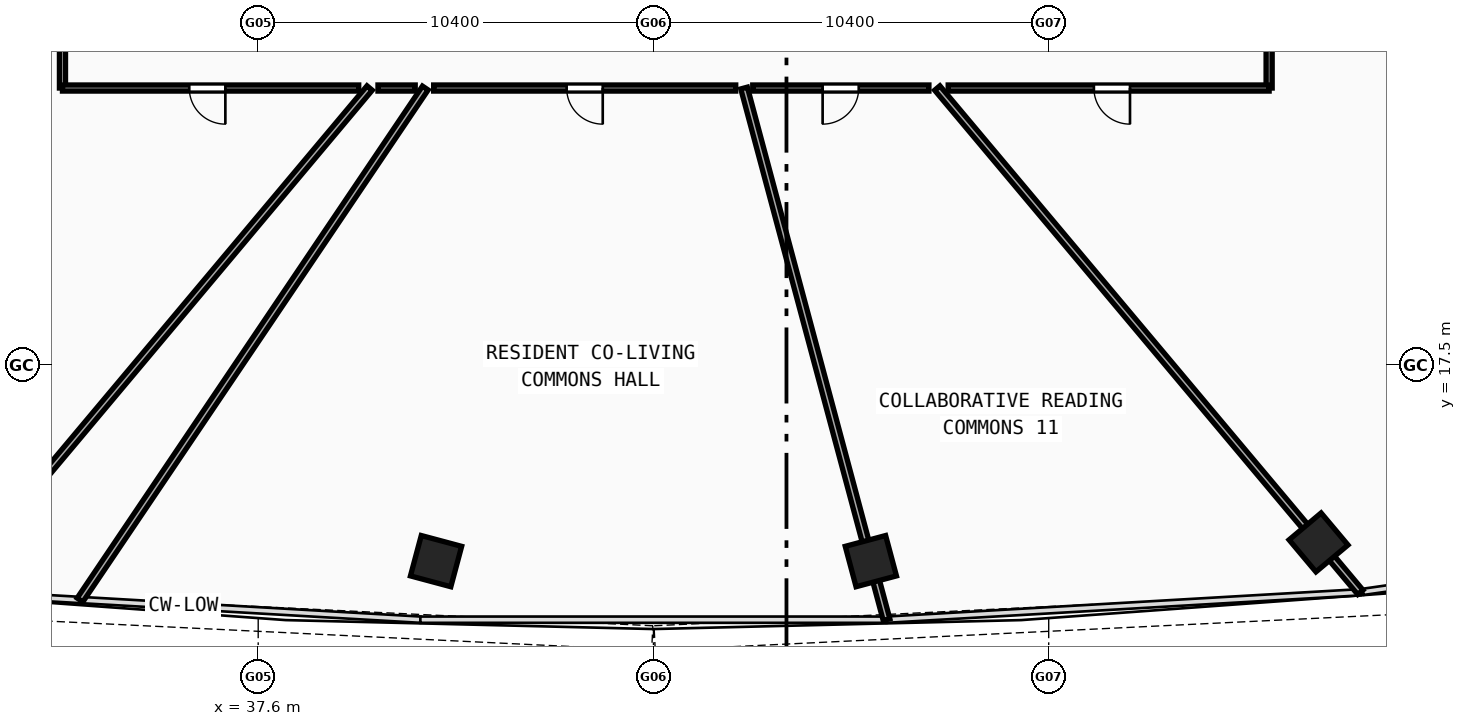
"""IFC4 building model, lengths in metres.
Left out: names, types, materials, properties, quantities, classifications, styles, units other than length and angle.
Written with IfcOpenShell. Run it as: python <this file> out.ifc"""

import sys

from ifc_helpers import new_model, si_unit, direction, frame, frame_2d, origin, origin_with_axes, origin_2d, place, context, subcontext, project, spatial, rectangle, hollow_rectangle, extrude, source, transform, mapped, element, fill, save


model = new_model("IFC4")
c1 = context("Model", 3, precision=1e-05, world=origin(), true_north=direction((0.0, 1.0)))
c2 = subcontext(c1, "Body", "Model", "MODEL_VIEW")
j1 = project(units=[si_unit("LENGTHUNIT", "METRE"), si_unit("PLANEANGLEUNIT", "RADIAN")], contexts=[c1])
p1 = place(None, origin())
s1 = spatial("IfcSite", under=j1, at=p1, CompositionType="ELEMENT")
p2 = place(p1, origin())
s2 = spatial("IfcBuilding", under=s1, at=p2, CompositionType="ELEMENT")
p3 = place(p2, frame((0.0, 0.0, 44.92)))
s3 = spatial("IfcBuildingStorey", under=s2, at=p3, CompositionType="ELEMENT", Elevation=44.92)
m1 = source(origin(), c2, "Body", "SweptSolid", [
    extrude(hollow_rectangle(XDim=1.1, YDim=1.1, WallThickness=0.045, at=origin_2d()), origin(), (0.0, 0.0, 1.0), 3.63),
])
for number, where, z_axis, x_axis in (
    (1, (42.28, 12.352, -0.26), (0.0, 0.0, 1.0), (0.966, -0.259, 0.0)),
    (2, (53.72, 12.352, -0.26), (0.0, 0.0, 1.0), (0.966, 0.259, 0.0)),
    (3, (65.5, 12.844, -0.26), (0.0, 0.0, 1.0), (0.766, 0.643, 0.0)),
):
    element("IfcColumn", number, at=place(p3, frame(where, z_axis=z_axis, x_axis=x_axis)), inside=s3, PredefinedType="COLUMN", context=c2, shape_type="MappedRepresentation", body=[
        mapped(m1, transform((0.0, 0.0, 0.0), scale=1.0)),
    ])
p4 = place(p3, frame((40.532, 24.8, 0.0), z_axis=(0.0, 0.0, 1.0), x_axis=(-0.642784696521, -0.766046887546, 0.0)))
e4 = element("IfcWall", 4, at=p4, inside=s3, PredefinedType="PARTITIONING", context=c2, shape_type="SweptSolid", body=[
    extrude(rectangle(XDim=17.319, YDim=0.18, at=frame_2d((8.659, 0.0))), origin(), (0.0, 0.0, 1.0), 2.67),
])
p5 = place(p3, frame((41.997, 24.8, 0.0), z_axis=(0.0, 0.0, 1.0), x_axis=(-0.559182499599, -0.82904458996, 0.0)))
e5 = element("IfcWall", 5, at=p5, inside=s3, PredefinedType="PARTITIONING", context=c2, shape_type="SweptSolid", body=[
    extrude(rectangle(XDim=16.248, YDim=0.18, at=frame_2d((8.124, 0.0))), origin(), (0.0, 0.0, 1.0), 2.67),
])
p6 = place(p3, frame((50.385, 24.8, 0.0), z_axis=(0.0, 0.0, 1.0), x_axis=(0.258819787056, -0.965925627483, 0.0)))
e6 = element("IfcWall", 6, at=p6, inside=s3, PredefinedType="PARTITIONING", context=c2, shape_type="SweptSolid", body=[
    extrude(rectangle(XDim=14.482, YDim=0.18, at=frame_2d((7.241, 0.0))), origin(), (0.0, 0.0, 1.0), 2.67),
])
p7 = place(p3, frame((55.468, 24.8, 0.0), z_axis=(0.0, 0.0, 1.0), x_axis=(0.642784696521, -0.766046887546, 0.0)))
e7 = element("IfcWall", 7, at=p7, inside=s3, PredefinedType="PARTITIONING", context=c2, shape_type="SweptSolid", body=[
    extrude(rectangle(XDim=17.319, YDim=0.18, at=frame_2d((8.659, 0.0))), origin(), (0.0, 0.0, 1.0), 2.67),
])
p8 = place(p3, frame((32.45, 24.8, 0.0), z_axis=(0.0, 0.0, 1.0), x_axis=(0.0, 1.0, 0.0)))
e8 = element("IfcWall", 8, at=p8, inside=s3, PredefinedType="PARTITIONING", context=c2, shape_type="SweptSolid", body=[
    extrude(rectangle(XDim=5.935, YDim=0.16, at=frame_2d((2.967, 0.0))), origin(), (0.0, 0.0, 1.0), 2.97),
])
p9 = place(p3, frame((64.2, 30.62, 0.0), z_axis=(0.0, 0.0, 1.0), x_axis=(0.0, -1.0, 0.0)))
e9 = element("IfcWall", 9, at=p9, inside=s3, PredefinedType="PARTITIONING", context=c2, shape_type="SweptSolid", body=[
    extrude(rectangle(XDim=5.82, YDim=0.16, at=frame_2d((2.91, 0.0))), origin(), (0.0, 0.0, 1.0), 2.97),
])
p10 = place(p3, frame((64.2, 24.8, 0.0), z_axis=(0.0, 0.0, 1.0), x_axis=(-1.0, 0.0, 0.0)))
e10 = element("IfcWall", 10, at=p10, inside=s3, PredefinedType="PARTITIONING", context=c2, shape_type="SweptSolid", body=[
    extrude(rectangle(XDim=8.445, YDim=0.16, at=frame_2d((4.222, 0.0))), origin(), (0.0, 0.0, 1.0), 2.97),
])
p11 = place(p10, frame((3.661, 0.0, 0.0)))
e11 = element("IfcOpeningElement", 11, at=p11, cuts=e10, PredefinedType="OPENING", context=c2, shape_type="SweptSolid", body=[
    extrude(rectangle(XDim=0.95, YDim=2.1, at=frame_2d((0.475, 1.05))), frame((0.0, 0.09, 0.0), z_axis=(0.0, -1.0, 0.0), x_axis=(1.0, 0.0, 0.0)), (0.0, 0.0, 1.0), 0.18),
])
p12 = place(p3, frame((55.248, 24.8, 0.0), z_axis=(0.0, 0.0, 1.0), x_axis=(-1.0, 0.0, 0.0)))
e12 = element("IfcWall", 12, at=p12, inside=s3, PredefinedType="PARTITIONING", context=c2, shape_type="SweptSolid", body=[
    extrude(rectangle(XDim=4.635, YDim=0.16, at=frame_2d((2.318, 0.0))), origin(), (0.0, 0.0, 1.0), 2.67),
])
p13 = place(p12, frame((1.847, 0.0, 0.0)))
e13 = element("IfcOpeningElement", 13, at=p13, cuts=e12, PredefinedType="OPENING", context=c2, shape_type="SweptSolid", body=[
    extrude(rectangle(XDim=0.95, YDim=2.1, at=frame_2d((0.475, 1.05))), frame((0.0, 0.09, 0.0), z_axis=(0.0, -1.0, 0.0), x_axis=(1.0, 0.0, 0.0)), (0.0, 0.0, 1.0), 0.18),
])
p14 = place(p3, frame((50.165, 24.8, 0.0), z_axis=(0.0, 0.0, 1.0), x_axis=(-1.0, 0.0, 0.0)))
e14 = element("IfcWall", 14, at=p14, inside=s3, PredefinedType="PARTITIONING", context=c2, shape_type="SweptSolid", body=[
    extrude(rectangle(XDim=7.948, YDim=0.16, at=frame_2d((3.974, 0.0))), origin(), (0.0, 0.0, 1.0), 2.67),
])
p15 = place(p14, frame((3.499, 0.0, 0.0)))
e15 = element("IfcOpeningElement", 15, at=p15, cuts=e14, PredefinedType="OPENING", context=c2, shape_type="SweptSolid", body=[
    extrude(rectangle(XDim=0.95, YDim=2.1, at=frame_2d((0.475, 1.05))), frame((0.0, 0.09, 0.0), z_axis=(0.0, -1.0, 0.0), x_axis=(1.0, 0.0, 0.0)), (0.0, 0.0, 1.0), 0.18),
])
p16 = place(p3, frame((41.731, 24.8, 0.0), z_axis=(0.0, 0.0, 1.0), x_axis=(-1.0, 0.0, 0.0)))
e16 = element("IfcWall", 16, at=p16, inside=s3, PredefinedType="PARTITIONING", context=c2, shape_type="SweptSolid", body=[
    extrude(rectangle(XDim=0.979, YDim=0.16, at=frame_2d((0.49, 0.0))), origin(), (0.0, 0.0, 1.0), 2.67),
])
p17 = place(p3, frame((40.245, 24.8, 0.0), z_axis=(0.0, 0.0, 1.0), x_axis=(-1.0, 0.0, 0.0)))
e17 = element("IfcWall", 17, at=p17, inside=s3, PredefinedType="PARTITIONING", context=c2, shape_type="SweptSolid", body=[
    extrude(rectangle(XDim=7.795, YDim=0.16, at=frame_2d((3.897, 0.0))), origin(), (0.0, 0.0, 1.0), 2.97),
])
p18 = place(p17, frame((3.509, 0.0, 0.0)))
e18 = element("IfcOpeningElement", 18, at=p18, cuts=e17, PredefinedType="OPENING", context=c2, shape_type="SweptSolid", body=[
    extrude(rectangle(XDim=0.95, YDim=2.1, at=frame_2d((0.475, 1.05))), frame((0.0, 0.09, 0.0), z_axis=(0.0, -1.0, 0.0), x_axis=(1.0, 0.0, 0.0)), (0.0, 0.0, 1.0), 0.18),
])
m2 = source(origin(), c2, "Body", "SweptSolid", [
    extrude(rectangle(XDim=0.95, YDim=2.1, at=frame_2d((0.475, 1.05))), frame((0.0, 0.025, 0.0), z_axis=(0.0, -1.0, 0.0), x_axis=(1.0, 0.0, 0.0)), (0.0, 0.0, 1.0), 0.05),
])
p19 = place(p18, origin_with_axes())
e19 = element("IfcDoor", 19, at=p19, inside=s3, OperationType="SINGLE_SWING_LEFT", PredefinedType="DOOR", context=c2, shape_type="MappedRepresentation", body=[
    mapped(m2, transform((0.0, 0.0, 0.0), scale=1.0)),
])
fill(e18, e19)
p20 = place(p15, origin_with_axes())
e20 = element("IfcDoor", 20, at=p20, inside=s3, OperationType="SINGLE_SWING_LEFT", PredefinedType="DOOR", context=c2, shape_type="MappedRepresentation", body=[
    mapped(m2, transform((0.0, 0.0, 0.0), scale=1.0)),
])
fill(e15, e20)
p21 = place(p13, origin_with_axes())
e21 = element("IfcDoor", 21, at=p21, inside=s3, OperationType="SINGLE_SWING_RIGHT", PredefinedType="DOOR", context=c2, shape_type="MappedRepresentation", body=[
    mapped(m2, transform((0.0, 0.0, 0.0), scale=1.0)),
])
fill(e13, e21)
p22 = place(p11, origin_with_axes())
e22 = element("IfcDoor", 22, at=p22, inside=s3, OperationType="SINGLE_SWING_LEFT", PredefinedType="DOOR", context=c2, shape_type="MappedRepresentation", body=[
    mapped(m2, transform((0.0, 0.0, 0.0), scale=1.0)),
])
fill(e11, e22)
save(model, sys.argv[1])
